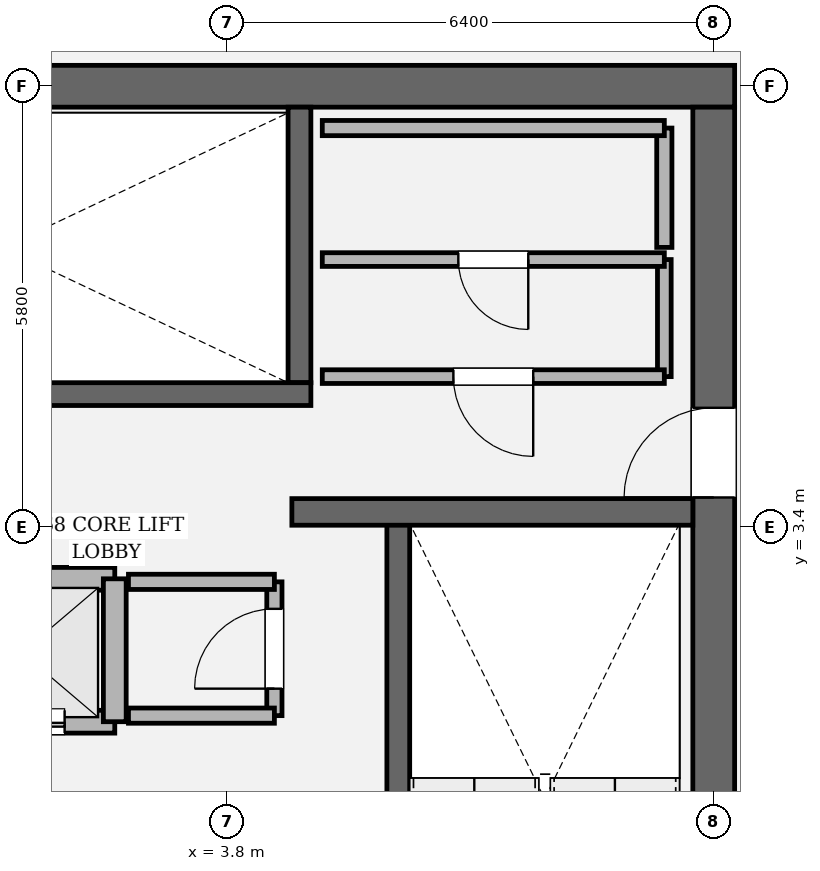
"""IFC4 building model, lengths in metres.
Left out: names, types, materials, properties, quantities, classifications, styles, units other than length and angle.
Written with IfcOpenShell. Run it as: python <this file> out.ifc"""

import sys

from ifc_helpers import new_model, si_unit, direction, frame, frame_2d, origin, place, context, subcontext, project, spatial, rectangle, extrude, element, fill, save


model = new_model("IFC4")
c1 = context("Model", 3, precision=1e-05, world=origin(), true_north=direction((0.0, 1.0)))
c2 = subcontext(c1, "Body", "Model", "MODEL_VIEW")
j1 = project(units=[si_unit("LENGTHUNIT", "METRE"), si_unit("PLANEANGLEUNIT", "RADIAN")], contexts=[c1])
p1 = place(None, origin())
s1 = spatial("IfcSite", under=j1, at=p1, CompositionType="ELEMENT")
p2 = place(p1, origin())
s2 = spatial("IfcBuilding", under=s1, at=p2, CompositionType="ELEMENT")
p3 = place(p2, frame((0.0, 0.0, 288.0)))
s3 = spatial("IfcBuildingStorey", under=s2, at=p3, CompositionType="ELEMENT", Elevation=288.0)
p4 = place(p3, frame((-10.475, 9.2, 0.0), z_axis=(0.0, 0.0, 1.0), x_axis=(1.0, 0.0, 0.0)))
e1 = element("IfcWall", 1, at=p4, inside=s3, PredefinedType="SHEAR", context=c2, shape_type="SweptSolid", body=[
    extrude(rectangle(XDim=20.95, YDim=0.55, at=frame_2d((10.475, 0.0))), origin(), (0.0, 0.0, 1.0), 4.2),
])
p5 = place(p3, frame((10.2, 8.925, 0.0), z_axis=(0.0, 0.0, 1.0), x_axis=(0.0, -1.0, 0.0)))
e2 = element("IfcWall", 2, at=p5, inside=s3, PredefinedType="SHEAR", context=c2, shape_type="SweptSolid", body=[
    extrude(rectangle(XDim=17.85, YDim=0.55, at=frame_2d((8.925, 0.0))), origin(), (0.0, 0.0, 1.0), 4.2),
])
p6 = place(p5, frame((3.955, 0.0, 0.0)))
e3 = element("IfcOpeningElement", 3, at=p6, cuts=e2, PredefinedType="OPENING", context=c2, shape_type="SweptSolid", body=[
    extrude(rectangle(XDim=1.18, YDim=2.2, at=frame_2d((0.59, 1.1))), frame((0.0, 0.285, 0.0), z_axis=(0.0, -1.0, 0.0), x_axis=(1.0, 0.0, 0.0)), (0.0, 0.0, 1.0), 0.57),
])
p7 = place(p3, frame((6.05, 3.45, 0.0), z_axis=(0.0, 0.0, 1.0), x_axis=(0.0, -1.0, 0.0)))
e4 = element("IfcWall", 4, at=p7, inside=s3, PredefinedType="SOLIDWALL", context=c2, shape_type="SweptSolid", body=[
    extrude(rectangle(XDim=8.95, YDim=0.3, at=frame_2d((4.475, 0.0))), origin(), (0.0, 0.0, 1.0), 4.2),
])
p8 = place(p3, frame((4.75, 8.925, 0.0), z_axis=(0.0, 0.0, 1.0), x_axis=(0.0, -1.0, 0.0)))
e5 = element("IfcWall", 5, at=p8, inside=s3, PredefinedType="SOLIDWALL", context=c2, shape_type="SweptSolid", body=[
    extrude(rectangle(XDim=3.625, YDim=0.3, at=frame_2d((1.812, 0.0))), origin(), (0.0, 0.0, 1.0), 4.2),
])
p9 = place(p3, frame((-4.9, 5.15, 0.0), z_axis=(0.0, 0.0, 1.0), x_axis=(1.0, 0.0, 0.0)))
e6 = element("IfcWall", 6, at=p9, inside=s3, PredefinedType="SOLIDWALL", context=c2, shape_type="SweptSolid", body=[
    extrude(rectangle(XDim=9.8, YDim=0.3, at=frame_2d((4.9, 0.0))), origin(), (0.0, 0.0, 1.0), 4.2),
])
p10 = place(p9, frame((0.56, 0.0, 0.0)))
e7 = element("IfcOpeningElement", 7, at=p10, cuts=e6, PredefinedType="OPENING", context=c2, shape_type="SweptSolid", body=[
    extrude(rectangle(XDim=1.18, YDim=2.2, at=frame_2d((0.59, 1.1))), frame((0.0, 0.16, 0.0), z_axis=(0.0, -1.0, 0.0), x_axis=(1.0, 0.0, 0.0)), (0.0, 0.0, 1.0), 0.32),
])
p11 = place(p3, frame((4.65, 3.6, 0.0), z_axis=(0.0, 0.0, 1.0), x_axis=(1.0, 0.0, 0.0)))
e8 = element("IfcWall", 8, at=p11, inside=s3, PredefinedType="SOLIDWALL", context=c2, shape_type="SweptSolid", body=[
    extrude(rectangle(XDim=5.275, YDim=0.35, at=frame_2d((2.638, 0.0))), origin(), (0.0, 0.0, 1.0), 4.2),
])
p12 = place(p3, frame((-2.32, 0.84, 0.0), z_axis=(0.0, 0.0, 1.0), x_axis=(1.0, 0.0, 0.0)))
e9 = element("IfcWall", 9, at=p12, inside=s3, PredefinedType="SOLIDWALL", context=c2, shape_type="SweptSolid", body=[
    extrude(rectangle(XDim=4.64, YDim=0.3, at=frame_2d((2.32, 0.0))), origin(), (0.0, 0.0, 1.0), 4.0),
])
p13 = place(p12, frame((0.66, 0.0, 0.0)))
e10 = element("IfcOpeningElement", 10, at=p13, cuts=e9, PredefinedType="OPENING", context=c2, shape_type="SweptSolid", body=[
    extrude(rectangle(XDim=1.12, YDim=2.25, at=frame_2d((0.56, 1.125))), frame((0.0, 0.16, 0.0), z_axis=(0.0, -1.0, 0.0), x_axis=(1.0, 0.0, 0.0)), (0.0, 0.0, 1.0), 0.32),
])
p14 = place(p12, frame((2.86, 0.0, 0.0)))
e11 = element("IfcOpeningElement", 11, at=p14, cuts=e9, PredefinedType="OPENING", context=c2, shape_type="SweptSolid", body=[
    extrude(rectangle(XDim=1.12, YDim=2.25, at=frame_2d((0.56, 1.125))), frame((0.0, 0.16, 0.0), z_axis=(0.0, -1.0, 0.0), x_axis=(1.0, 0.0, 0.0)), (0.0, 0.0, 1.0), 0.32),
])
p15 = place(p3, frame((-2.32, 2.72, 0.0), z_axis=(0.0, 0.0, 1.0), x_axis=(1.0, 0.0, 0.0)))
e12 = element("IfcWall", 12, at=p15, inside=s3, PredefinedType="SOLIDWALL", context=c2, shape_type="SweptSolid", body=[
    extrude(rectangle(XDim=4.64, YDim=0.3, at=frame_2d((2.32, 0.0))), origin(), (0.0, 0.0, 1.0), 4.0),
])
p16 = place(p3, frame((2.32, 0.84, 0.0), z_axis=(0.0, 0.0, 1.0), x_axis=(0.0, 1.0, 0.0)))
e13 = element("IfcWall", 13, at=p16, inside=s3, PredefinedType="SOLIDWALL", context=c2, shape_type="SweptSolid", body=[
    extrude(rectangle(XDim=1.88, YDim=0.3, at=frame_2d((0.94, 0.0))), origin(), (0.0, 0.0, 1.0), 4.0),
])
p17 = place(p3, frame((4.42, 0.92, 0.0), z_axis=(0.0, 0.0, 1.0), x_axis=(0.0, 1.0, 0.0)))
e14 = element("IfcWall", 14, at=p17, inside=s3, PredefinedType="SOLIDWALL", context=c2, shape_type="SweptSolid", body=[
    extrude(rectangle(XDim=1.76, YDim=0.2, at=frame_2d((0.88, 0.0))), origin(), (0.0, 0.0, 1.0), 4.0),
])
p18 = place(p17, frame((0.355, 0.0, 0.0)))
e15 = element("IfcOpeningElement", 15, at=p18, cuts=e14, PredefinedType="OPENING", context=c2, shape_type="SweptSolid", body=[
    extrude(rectangle(XDim=1.05, YDim=2.2, at=frame_2d((0.525, 1.1))), frame((0.0, 0.11, 0.0), z_axis=(0.0, -1.0, 0.0), x_axis=(1.0, 0.0, 0.0)), (0.0, 0.0, 1.0), 0.22),
])
for number, where, z_axis, x_axis in (
    (16, (4.42, 2.68, 0.0), (0.0, 0.0, 1.0), (-1.0, 0.0, 0.0)),
    (17, (2.5, 0.92, 0.0), (0.0, 0.0, 1.0), (1.0, 0.0, 0.0)),
):
    element("IfcWall", number, at=place(p3, frame(where, z_axis=z_axis, x_axis=x_axis)), inside=s3, PredefinedType="SOLIDWALL", context=c2, shape_type="SweptSolid", body=[
        extrude(rectangle(XDim=1.92, YDim=0.2, at=frame_2d((0.96, 0.0))), origin(), (0.0, 0.0, 1.0), 4.0),
    ])
p19 = place(p3, frame((9.55, 5.38, 0.0), z_axis=(0.0, 0.0, 1.0), x_axis=(0.0, 1.0, 0.0)))
e18 = element("IfcWall", 18, at=p19, inside=s3, PredefinedType="PARTITIONING", context=c2, shape_type="SweptSolid", body=[
    extrude(rectangle(XDim=1.54, YDim=0.18, at=frame_2d((0.77, 0.0))), origin(), (0.0, 0.0, 1.0), 4.0),
])
p20 = place(p3, frame((9.55, 6.92, 0.0), z_axis=(0.0, 0.0, 1.0), x_axis=(-1.0, 0.0, 0.0)))
e19 = element("IfcWall", 19, at=p20, inside=s3, PredefinedType="PARTITIONING", context=c2, shape_type="SweptSolid", body=[
    extrude(rectangle(XDim=4.5, YDim=0.18, at=frame_2d((2.25, 0.0))), origin(), (0.0, 0.0, 1.0), 4.0),
])
p21 = place(p20, frame((1.79, 0.0, 0.0)))
e20 = element("IfcOpeningElement", 20, at=p21, cuts=e19, PredefinedType="OPENING", context=c2, shape_type="SweptSolid", body=[
    extrude(rectangle(XDim=0.92, YDim=2.1, at=frame_2d((0.46, 1.05))), frame((0.0, 0.1, 0.0), z_axis=(0.0, -1.0, 0.0), x_axis=(1.0, 0.0, 0.0)), (0.0, 0.0, 1.0), 0.2),
])
p22 = place(p3, frame((5.05, 5.38, 0.0), z_axis=(0.0, 0.0, 1.0), x_axis=(1.0, 0.0, 0.0)))
e21 = element("IfcWall", 21, at=p22, inside=s3, PredefinedType="PARTITIONING", context=c2, shape_type="SweptSolid", body=[
    extrude(rectangle(XDim=4.5, YDim=0.18, at=frame_2d((2.25, 0.0))), origin(), (0.0, 0.0, 1.0), 4.0),
])
p23 = place(p22, frame((1.725, 0.0, 0.0)))
e22 = element("IfcOpeningElement", 22, at=p23, cuts=e21, PredefinedType="OPENING", context=c2, shape_type="SweptSolid", body=[
    extrude(rectangle(XDim=1.05, YDim=2.2, at=frame_2d((0.525, 1.1))), frame((0.0, 0.1, 0.0), z_axis=(0.0, -1.0, 0.0), x_axis=(1.0, 0.0, 0.0)), (0.0, 0.0, 1.0), 0.2),
])
p24 = place(p3, frame((9.55, 7.08, 0.0), z_axis=(0.0, 0.0, 1.0), x_axis=(0.0, 1.0, 0.0)))
e23 = element("IfcWall", 23, at=p24, inside=s3, PredefinedType="SOLIDWALL", context=c2, shape_type="SweptSolid", body=[
    extrude(rectangle(XDim=1.57, YDim=0.2, at=frame_2d((0.785, 0.0))), origin(), (0.0, 0.0, 1.0), 4.0),
])
p25 = place(p3, frame((9.55, 8.65, 0.0), z_axis=(0.0, 0.0, 1.0), x_axis=(-1.0, 0.0, 0.0)))
e24 = element("IfcWall", 24, at=p25, inside=s3, PredefinedType="SOLIDWALL", context=c2, shape_type="SweptSolid", body=[
    extrude(rectangle(XDim=4.5, YDim=0.2, at=frame_2d((2.25, 0.0))), origin(), (0.0, 0.0, 1.0), 4.0),
])
p26 = place(p6, origin())
e25 = element("IfcDoor", 25, at=p26, inside=s3, OperationType="SINGLE_SWING_RIGHT", PredefinedType="DOOR", context=c2, shape_type="SweptSolid", body=[
    extrude(rectangle(XDim=1.18, YDim=2.2, at=frame_2d((0.59, 1.1))), frame((0.0, 0.025, 0.0), z_axis=(0.0, -1.0, 0.0), x_axis=(1.0, 0.0, 0.0)), (0.0, 0.0, 1.0), 0.05),
])
fill(e3, e25)
p27 = place(p14, origin())
e26 = element("IfcDoor", 26, at=p27, inside=s3, OperationType="DOUBLE_DOOR_SLIDING", PredefinedType="DOOR", context=c2, shape_type="SweptSolid", body=[
    extrude(rectangle(XDim=1.12, YDim=2.25, at=frame_2d((0.56, 1.125))), frame((0.0, 0.025, 0.0), z_axis=(0.0, -1.0, 0.0), x_axis=(1.0, 0.0, 0.0)), (0.0, 0.0, 1.0), 0.05),
])
fill(e11, e26)
p28 = place(p18, origin())
e27 = element("IfcDoor", 27, at=p28, inside=s3, OperationType="SINGLE_SWING_LEFT", PredefinedType="DOOR", context=c2, shape_type="SweptSolid", body=[
    extrude(rectangle(XDim=1.05, YDim=2.2, at=frame_2d((0.525, 1.1))), frame((0.0, 0.025, 0.0), z_axis=(0.0, -1.0, 0.0), x_axis=(1.0, 0.0, 0.0)), (0.0, 0.0, 1.0), 0.05),
])
fill(e15, e27)
p29 = place(p23, origin())
e28 = element("IfcDoor", 28, at=p29, inside=s3, OperationType="SINGLE_SWING_RIGHT", PredefinedType="DOOR", context=c2, shape_type="SweptSolid", body=[
    extrude(rectangle(XDim=1.05, YDim=2.2, at=frame_2d((0.525, 1.1))), frame((0.0, 0.025, 0.0), z_axis=(0.0, -1.0, 0.0), x_axis=(1.0, 0.0, 0.0)), (0.0, 0.0, 1.0), 0.05),
])
fill(e22, e28)
p30 = place(p21, origin())
e29 = element("IfcDoor", 29, at=p30, inside=s3, OperationType="SINGLE_SWING_LEFT", PredefinedType="DOOR", context=c2, shape_type="SweptSolid", body=[
    extrude(rectangle(XDim=0.92, YDim=2.1, at=frame_2d((0.46, 1.05))), frame((0.0, 0.025, 0.0), z_axis=(0.0, -1.0, 0.0), x_axis=(1.0, 0.0, 0.0)), (0.0, 0.0, 1.0), 0.05),
])
fill(e20, e29)
save(model, sys.argv[1])
